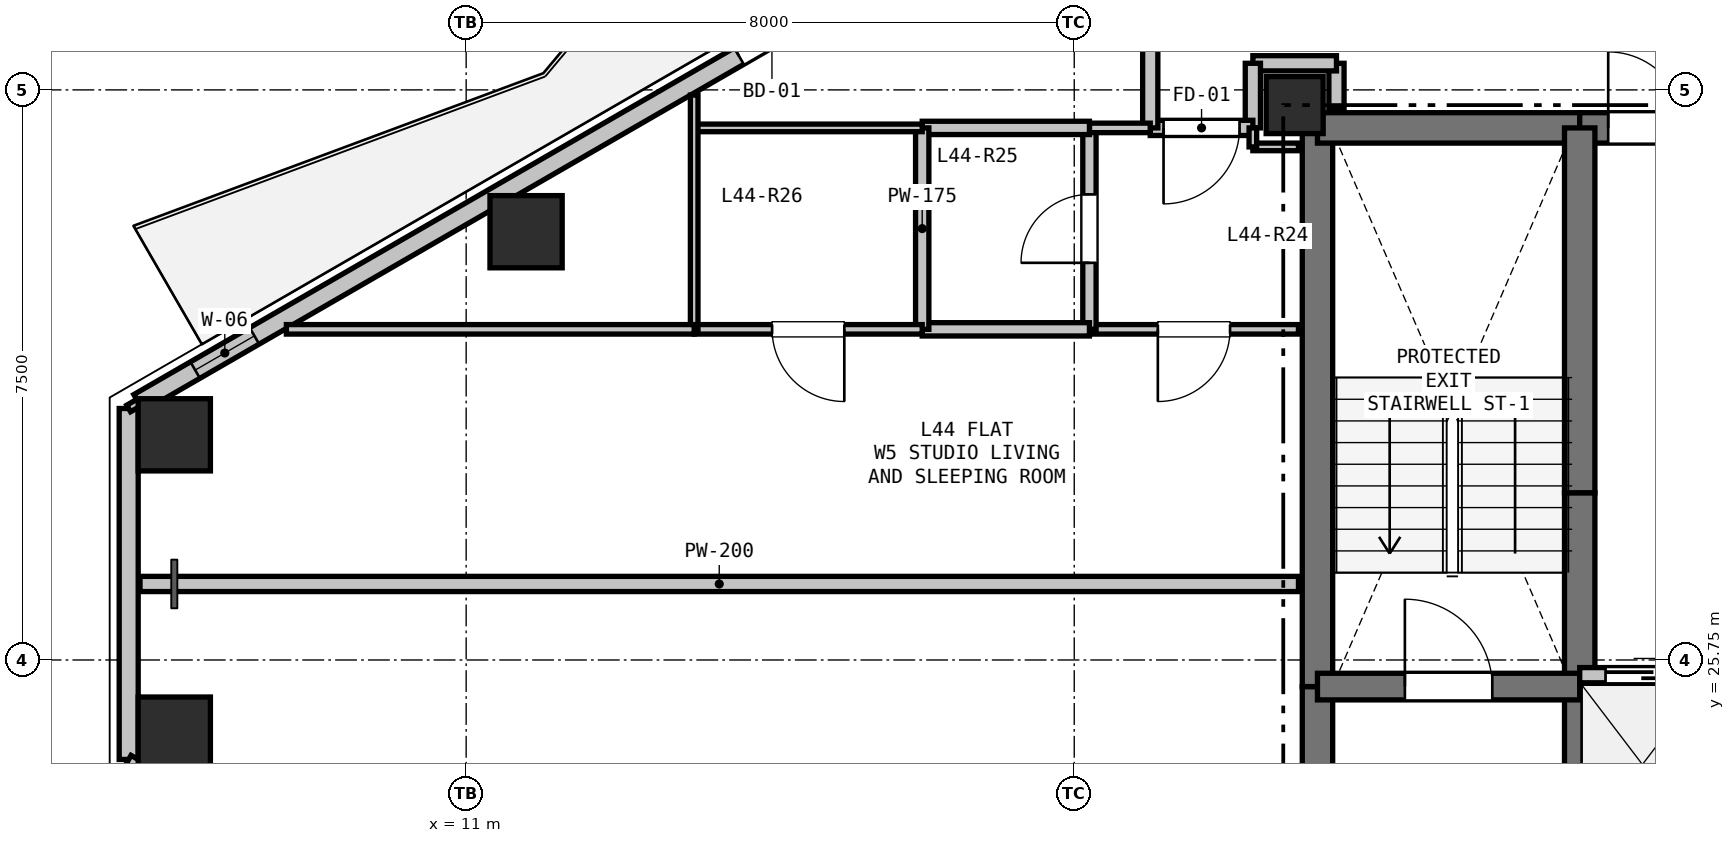
"""IFC4 building model, lengths in metres.
Left out: names, types, materials, properties, quantities, classifications, styles, units other than length and angle.
Written with IfcOpenShell. Run it as: python <this file> out.ifc"""

import sys

from ifc_helpers import new_model, si_unit, direction, frame, frame_2d, origin, origin_2d, place, context, subcontext, project, spatial, rectangle, hollow_rectangle, extrude, element, fill, save


model = new_model("IFC4")
c1 = context("Model", 3, precision=1e-05, world=origin(), true_north=direction((0.0, 1.0)))
c2 = subcontext(c1, "Body", "Model", "MODEL_VIEW")
j1 = project(units=[si_unit("LENGTHUNIT", "METRE"), si_unit("PLANEANGLEUNIT", "RADIAN")], contexts=[c1])
p1 = place(None, origin())
s1 = spatial("IfcSite", under=j1, at=p1, CompositionType="ELEMENT")
p2 = place(p1, origin())
s2 = spatial("IfcBuilding", under=s1, at=p2, CompositionType="ELEMENT")
p3 = place(p2, frame((0.0, 0.0, 157.5)))
s3 = spatial("IfcBuildingStorey", under=s2, at=p3, CompositionType="ELEMENT", Elevation=157.5)
p4 = place(p3, frame((21.9, 33.05, 0.0), z_axis=(0.0, 0.0, 1.0), x_axis=(1.0, 0.0, 0.0)))
e1 = element("IfcColumn", 1, at=p4, inside=s3, PredefinedType="COLUMN", context=c2, shape_type="SweptSolid", body=[
    extrude(rectangle(XDim=0.75, YDim=0.75, at=origin_2d()), origin(), (0.0, 0.0, 1.0), 3.3),
])
for number, where, z_axis, x_axis in (
    (2, (7.16, 28.712, 0.0), (0.0, 0.0, 1.0), (1.0, 0.0, 0.0)),
    (3, (11.788, 31.384, 0.0), (0.0, 0.0, 1.0), (1.0, 0.0, 0.0)),
    (4, (7.16, 24.788, 0.0), (0.0, 0.0, 1.0), (1.0, 0.0, 0.0)),
):
    element("IfcColumn", number, at=place(p3, frame(where, z_axis=z_axis, x_axis=x_axis)), inside=s3, PredefinedType="COLUMN", context=c2, shape_type="SweptSolid", body=[
        extrude(hollow_rectangle(XDim=0.95, YDim=0.95, WallThickness=0.028, at=origin_2d()), origin(), (0.0, 0.0, 1.0), 3.3),
    ])
p5 = place(p3, frame((6.56, 24.441, 0.0), z_axis=(0.0, 0.0, 1.0), x_axis=(0.0, 1.0, 0.0)))
e5 = element("IfcWall", 5, at=p5, inside=s3, PredefinedType="SOLIDWALL", context=c2, shape_type="SweptSolid", body=[
    extrude(rectangle(XDim=4.617, YDim=0.25, at=frame_2d((2.309, 0.0))), origin(), (0.0, 0.0, 1.0), 2.6),
])
p6 = place(p3, frame((6.69, 29.134, 0.0), z_axis=(0.0, 0.0, 1.0), x_axis=(0.866027848477, 0.499995765644, 0.0)))
e6 = element("IfcWall", 6, at=p6, inside=s3, PredefinedType="SOLIDWALL", context=c2, shape_type="SweptSolid", body=[
    extrude(rectangle(XDim=11.186, YDim=0.25, at=frame_2d((5.593, 0.0))), origin(), (0.0, 0.0, 1.0), 2.6),
])
p7 = place(p6, frame((9.122, 0.0, 0.0)))
e7 = element("IfcOpeningElement", 7, at=p7, cuts=e6, PredefinedType="OPENING", context=c2, shape_type="SweptSolid", body=[
    extrude(rectangle(XDim=1.0, YDim=2.1, at=frame_2d((0.5, 1.05))), frame((0.0, 0.135, 0.0), z_axis=(0.0, -1.0, 0.0), x_axis=(1.0, 0.0, 0.0)), (0.0, 0.0, 1.0), 0.27),
])
p8 = place(p6, frame((0.86, 0.0, 0.9)))
e8 = element("IfcOpeningElement", 8, at=p8, cuts=e6, PredefinedType="OPENING", context=c2, shape_type="SweptSolid", body=[
    extrude(rectangle(XDim=0.9, YDim=1.4, at=frame_2d((0.45, 0.7))), frame((0.0, 0.135, 0.0), z_axis=(0.0, -1.0, 0.0), x_axis=(1.0, 0.0, 0.0)), (0.0, 0.0, 1.0), 0.27),
])
p9 = place(p3, frame((16.378, 18.773, 0.0), z_axis=(0.0, 0.0, 1.0), x_axis=(-0.866027848477, 0.499995765644, 0.0)))
e9 = element("IfcWall", 9, at=p9, inside=s3, PredefinedType="SOLIDWALL", context=c2, shape_type="SweptSolid", body=[
    extrude(rectangle(XDim=11.186, YDim=0.25, at=frame_2d((5.593, 0.0))), origin(), (0.0, 0.0, 1.0), 2.6),
])
p10 = place(p9, frame((6.974, 0.0, 0.9)))
e10 = element("IfcOpeningElement", 10, at=p10, cuts=e9, PredefinedType="OPENING", context=c2, shape_type="SweptSolid", body=[
    extrude(rectangle(XDim=1.5, YDim=1.5, at=frame_2d((0.75, 0.75))), frame((0.0, 0.135, 0.0), z_axis=(0.0, -1.0, 0.0), x_axis=(1.0, 0.0, 0.0)), (0.0, 0.0, 1.0), 0.27),
])
p11 = place(p3, frame((22.2, 20.75, 0.0), z_axis=(0.0, 0.0, 1.0), x_axis=(0.0, 1.0, 0.0)))
e11 = element("IfcWall", 11, at=p11, inside=s3, PredefinedType="SHEAR", context=c2, shape_type="SweptSolid", body=[
    extrude(rectangle(XDim=4.65, YDim=0.4, at=frame_2d((2.325, 0.0))), origin(), (0.0, 0.0, 1.0), 2.98),
])
p12 = place(p3, frame((22.2, 25.4, 0.0), z_axis=(0.0, 0.0, 1.0), x_axis=(0.0, 1.0, 0.0)))
e12 = element("IfcWall", 12, at=p12, inside=s3, PredefinedType="SHEAR", context=c2, shape_type="SweptSolid", body=[
    extrude(rectangle(XDim=7.35, YDim=0.4, at=frame_2d((3.675, 0.0))), origin(), (0.0, 0.0, 1.0), 2.98),
])
p13 = place(p3, frame((22.2, 32.75, 0.0), z_axis=(0.0, 0.0, 1.0), x_axis=(1.0, 0.0, 0.0)))
e13 = element("IfcWall", 13, at=p13, inside=s3, PredefinedType="SHEAR", context=c2, shape_type="SweptSolid", body=[
    extrude(rectangle(XDim=3.45, YDim=0.4, at=frame_2d((1.725, 0.0))), origin(), (0.0, 0.0, 1.0), 2.98),
])
p14 = place(p3, frame((25.65, 32.75, 0.0), z_axis=(0.0, 0.0, 1.0), x_axis=(1.0, 0.0, 0.0)))
e14 = element("IfcWall", 14, at=p14, inside=s3, PredefinedType="SHEAR", context=c2, shape_type="SweptSolid", body=[
    extrude(rectangle(XDim=1.75, YDim=0.4, at=frame_2d((0.875, 0.0))), origin(), (0.0, 0.0, 1.0), 2.98),
])
p15 = place(p14, frame((0.375, 0.0, 0.0)))
e15 = element("IfcOpeningElement", 15, at=p15, cuts=e14, PredefinedType="OPENING", context=c2, shape_type="SweptSolid", body=[
    extrude(rectangle(XDim=1.0, YDim=2.15, at=frame_2d((0.5, 1.075))), frame((0.0, 0.21, 0.0), z_axis=(0.0, -1.0, 0.0), x_axis=(1.0, 0.0, 0.0)), (0.0, 0.0, 1.0), 0.42),
])
p16 = place(p3, frame((25.65, 22.75, 0.0), z_axis=(0.0, 0.0, 1.0), x_axis=(0.0, 1.0, 0.0)))
e16 = element("IfcWall", 16, at=p16, inside=s3, PredefinedType="SHEAR", context=c2, shape_type="SweptSolid", body=[
    extrude(rectangle(XDim=2.8, YDim=0.4, at=frame_2d((1.4, 0.0))), origin(), (0.0, 0.0, 1.0), 2.98),
])
p17 = place(p3, frame((25.65, 25.55, 0.0), z_axis=(0.0, 0.0, 1.0), x_axis=(0.0, 1.0, 0.0)))
e17 = element("IfcWall", 17, at=p17, inside=s3, PredefinedType="SHEAR", context=c2, shape_type="SweptSolid", body=[
    extrude(rectangle(XDim=2.4, YDim=0.4, at=frame_2d((1.2, 0.0))), origin(), (0.0, 0.0, 1.0), 2.98),
])
p18 = place(p3, frame((25.65, 27.95, 0.0), z_axis=(0.0, 0.0, 1.0), x_axis=(0.0, 1.0, 0.0)))
e18 = element("IfcWall", 18, at=p18, inside=s3, PredefinedType="SHEAR", context=c2, shape_type="SweptSolid", body=[
    extrude(rectangle(XDim=4.8, YDim=0.4, at=frame_2d((2.4, 0.0))), origin(), (0.0, 0.0, 1.0), 2.98),
])
p19 = place(p3, frame((22.2, 25.4, 0.0), z_axis=(0.0, 0.0, 1.0), x_axis=(1.0, 0.0, 0.0)))
e19 = element("IfcWall", 19, at=p19, inside=s3, PredefinedType="SHEAR", context=c2, shape_type="SweptSolid", body=[
    extrude(rectangle(XDim=3.45, YDim=0.35, at=frame_2d((1.725, 0.0))), origin(), (0.0, 0.0, 1.0), 2.98),
])
p20 = place(p19, frame((1.15, 0.0, 0.0)))
e20 = element("IfcOpeningElement", 20, at=p20, cuts=e19, PredefinedType="OPENING", context=c2, shape_type="SweptSolid", body=[
    extrude(rectangle(XDim=1.15, YDim=2.15, at=frame_2d((0.575, 1.075))), frame((0.0, 0.185, 0.0), z_axis=(0.0, -1.0, 0.0), x_axis=(1.0, 0.0, 0.0)), (0.0, 0.0, 1.0), 0.37),
])
p21 = place(p3, frame((25.65, 25.55, 0.0), z_axis=(0.0, 0.0, 1.0), x_axis=(1.0, 0.0, 0.0)))
e21 = element("IfcWall", 21, at=p21, inside=s3, PredefinedType="PARTITIONING", context=c2, shape_type="SweptSolid", body=[
    extrude(rectangle(XDim=4.95, YDim=0.2, at=frame_2d((2.475, 0.0))), origin(), (0.0, 0.0, 1.0), 2.98),
])
p22 = place(p21, frame((0.34, 0.0, 0.0)))
e22 = element("IfcOpeningElement", 22, at=p22, cuts=e21, PredefinedType="OPENING", context=c2, shape_type="SweptSolid", body=[
    extrude(rectangle(XDim=1.1, YDim=2.15, at=frame_2d((0.55, 1.075))), frame((0.0, 0.11, 0.0), z_axis=(0.0, -1.0, 0.0), x_axis=(1.0, 0.0, 0.0)), (0.0, 0.0, 1.0), 0.22),
])
p23 = place(p21, frame((1.99, 0.0, 0.0)))
e23 = element("IfcOpeningElement", 23, at=p23, cuts=e21, PredefinedType="OPENING", context=c2, shape_type="SweptSolid", body=[
    extrude(rectangle(XDim=1.1, YDim=2.15, at=frame_2d((0.55, 1.075))), frame((0.0, 0.11, 0.0), z_axis=(0.0, -1.0, 0.0), x_axis=(1.0, 0.0, 0.0)), (0.0, 0.0, 1.0), 0.22),
])
p24 = place(p21, frame((3.64, 0.0, 0.0)))
e24 = element("IfcOpeningElement", 24, at=p24, cuts=e21, PredefinedType="OPENING", context=c2, shape_type="SweptSolid", body=[
    extrude(rectangle(XDim=1.1, YDim=2.15, at=frame_2d((0.55, 1.075))), frame((0.0, 0.11, 0.0), z_axis=(0.0, -1.0, 0.0), x_axis=(1.0, 0.0, 0.0)), (0.0, 0.0, 1.0), 0.22),
])
p25 = place(p3, frame((22.45, 33.0, 0.0), z_axis=(0.0, 0.0, 1.0), x_axis=(0.0, 1.0, 0.0)))
e25 = element("IfcWall", 25, at=p25, inside=s3, PredefinedType="PARTITIONING", context=c2, shape_type="SweptSolid", body=[
    extrude(rectangle(XDim=0.6, YDim=0.2, at=frame_2d((0.3, 0.0))), origin(), (0.0, 0.0, 1.0), 2.505),
])
p26 = place(p3, frame((22.45, 33.6, 0.0), z_axis=(0.0, 0.0, 1.0), x_axis=(-1.0, 0.0, 0.0)))
e26 = element("IfcWall", 26, at=p26, inside=s3, PredefinedType="PARTITIONING", context=c2, shape_type="SweptSolid", body=[
    extrude(rectangle(XDim=1.1, YDim=0.2, at=frame_2d((0.55, 0.0))), origin(), (0.0, 0.0, 1.0), 2.98),
])
p27 = place(p3, frame((21.35, 33.6, 0.0), z_axis=(0.0, 0.0, 1.0), x_axis=(0.0, -1.0, 0.0)))
e27 = element("IfcWall", 27, at=p27, inside=s3, PredefinedType="PARTITIONING", context=c2, shape_type="SweptSolid", body=[
    extrude(rectangle(XDim=0.85, YDim=0.2, at=frame_2d((0.425, 0.0))), origin(), (0.0, 0.0, 1.0), 2.428),
])
p28 = place(p3, frame((21.35, 32.75, 0.0), z_axis=(0.0, 0.0, 1.0), x_axis=(-1.0, 0.0, 0.0)))
e28 = element("IfcWall", 28, at=p28, inside=s3, PredefinedType="PARTITIONING", context=c2, shape_type="SweptSolid", body=[
    extrude(rectangle(XDim=1.35, YDim=0.2, at=frame_2d((0.675, 0.0))), origin(), (0.0, 0.0, 1.0), 2.428),
])
p29 = place(p28, frame((0.175, 0.0, 0.0)))
e29 = element("IfcOpeningElement", 29, at=p29, cuts=e28, PredefinedType="OPENING", context=c2, shape_type="SweptSolid", body=[
    extrude(rectangle(XDim=1.0, YDim=2.15, at=frame_2d((0.5, 1.075))), frame((0.0, 0.11, 0.0), z_axis=(0.0, -1.0, 0.0), x_axis=(1.0, 0.0, 0.0)), (0.0, 0.0, 1.0), 0.22),
])
p30 = place(p3, frame((20.0, 32.75, 0.0), z_axis=(0.0, 0.0, 1.0), x_axis=(0.0, 1.0, 0.0)))
e30 = element("IfcWall", 30, at=p30, inside=s3, PredefinedType="PARTITIONING", context=c2, shape_type="SweptSolid", body=[
    extrude(rectangle(XDim=2.6, YDim=0.2, at=frame_2d((1.3, 0.0))), origin(), (0.0, 0.0, 1.0), 2.428),
])
p31 = place(p3, frame((21.35, 32.5, 0.0), z_axis=(0.0, 0.0, 1.0), x_axis=(1.0, 0.0, 0.0)))
e31 = element("IfcWall", 31, at=p31, inside=s3, PredefinedType="PARTITIONING", context=c2, shape_type="SweptSolid", body=[
    extrude(rectangle(XDim=0.6, YDim=0.1, at=frame_2d((0.3, 0.0))), origin(), (0.0, 0.0, 1.0), 2.505),
])
p32 = place(p3, frame((21.95, 30.1, 0.0), z_axis=(0.0, 0.0, 1.0), x_axis=(-1.0, 0.0, 0.0)))
e32 = element("IfcWall", 32, at=p32, inside=s3, PredefinedType="PARTITIONING", context=c2, shape_type="SweptSolid", body=[
    extrude(rectangle(XDim=2.75, YDim=0.125, at=frame_2d((1.375, 0.0))), origin(), (0.0, 0.0, 1.0), 2.505),
])
p33 = place(p32, frame((0.9, 0.0, 0.0)))
e33 = element("IfcOpeningElement", 33, at=p33, cuts=e32, PredefinedType="OPENING", context=c2, shape_type="SweptSolid", body=[
    extrude(rectangle(XDim=0.95, YDim=2.1, at=frame_2d((0.475, 1.05))), frame((0.0, 0.073, 0.0), z_axis=(0.0, -1.0, 0.0), x_axis=(1.0, 0.0, 0.0)), (0.0, 0.0, 1.0), 0.145),
])
p34 = place(p3, frame((19.2, 30.1, 0.0), z_axis=(0.0, 0.0, 1.0), x_axis=(0.0, 1.0, 0.0)))
e34 = element("IfcWall", 34, at=p34, inside=s3, PredefinedType="PLUMBINGWALL", context=c2, shape_type="SweptSolid", body=[
    extrude(rectangle(XDim=2.65, YDim=0.175, at=frame_2d((1.325, 0.0))), origin(), (0.0, 0.0, 1.0), 2.428),
])
p35 = place(p34, frame((0.875, 0.0, 0.0)))
e35 = element("IfcOpeningElement", 35, at=p35, cuts=e34, PredefinedType="OPENING", context=c2, shape_type="SweptSolid", body=[
    extrude(rectangle(XDim=0.9, YDim=2.1, at=frame_2d((0.45, 1.05))), frame((0.0, 0.097, 0.0), z_axis=(0.0, -1.0, 0.0), x_axis=(1.0, 0.0, 0.0)), (0.0, 0.0, 1.0), 0.195),
])
p36 = place(p3, frame((19.2, 32.75, 0.0), z_axis=(0.0, 0.0, 1.0), x_axis=(1.0, 0.0, 0.0)))
e36 = element("IfcWall", 36, at=p36, inside=s3, PredefinedType="PARTITIONING", context=c2, shape_type="SweptSolid", body=[
    extrude(rectangle(XDim=0.8, YDim=0.125, at=frame_2d((0.4, 0.0))), origin(), (0.0, 0.0, 1.0), 2.428),
])
p37 = place(p3, frame((21.35, 32.75, 0.0), z_axis=(0.0, 0.0, 1.0), x_axis=(0.0, -1.0, 0.0)))
e37 = element("IfcWall", 37, at=p37, inside=s3, PredefinedType="PARTITIONING", context=c2, shape_type="SweptSolid", body=[
    extrude(rectangle(XDim=0.25, YDim=0.1, at=frame_2d((0.125, 0.0))), origin(), (0.0, 0.0, 1.0), 2.98),
])
p38 = place(p3, frame((17.0, 32.75, 0.0), z_axis=(0.0, 0.0, 1.0), x_axis=(1.0, 0.0, 0.0)))
e38 = element("IfcWall", 38, at=p38, inside=s3, PredefinedType="PLUMBINGWALL", context=c2, shape_type="SweptSolid", body=[
    extrude(rectangle(XDim=2.2, YDim=0.175, at=frame_2d((1.1, 0.0))), origin(), (0.0, 0.0, 1.0), 2.428),
])
p39 = place(p3, frame((19.2, 30.1, 0.0), z_axis=(0.0, 0.0, 1.0), x_axis=(-1.0, 0.0, 0.0)))
e39 = element("IfcWall", 39, at=p39, inside=s3, PredefinedType="PLUMBINGWALL", context=c2, shape_type="SweptSolid", body=[
    extrude(rectangle(XDim=2.2, YDim=0.175, at=frame_2d((1.1, 0.0))), origin(), (0.0, 0.0, 1.0), 2.98),
])
p40 = place(p3, frame((17.0, 30.1, 0.0), z_axis=(0.0, 0.0, 1.0), x_axis=(0.0, 1.0, 0.0)))
e40 = element("IfcWall", 40, at=p40, inside=s3, PredefinedType="PLUMBINGWALL", context=c2, shape_type="SweptSolid", body=[
    extrude(rectangle(XDim=2.65, YDim=0.175, at=frame_2d((1.325, 0.0))), origin(), (0.0, 0.0, 1.0), 2.428),
])
p41 = place(p3, frame((14.0, 32.75, 0.0), z_axis=(0.0, 0.0, 1.0), x_axis=(1.0, 0.0, 0.0)))
e41 = element("IfcWall", 41, at=p41, inside=s3, PredefinedType="PARTITIONING", context=c2, shape_type="SweptSolid", body=[
    extrude(rectangle(XDim=3.0, YDim=0.1, at=frame_2d((1.5, 0.0))), origin(), (0.0, 0.0, 1.0), 2.365),
])
p42 = place(p3, frame((17.0, 30.1, 0.0), z_axis=(0.0, 0.0, 1.0), x_axis=(-1.0, 0.0, 0.0)))
e42 = element("IfcWall", 42, at=p42, inside=s3, PredefinedType="PARTITIONING", context=c2, shape_type="SweptSolid", body=[
    extrude(rectangle(XDim=3.0, YDim=0.125, at=frame_2d((1.5, 0.0))), origin(), (0.0, 0.0, 1.0), 2.98),
])
p43 = place(p42, frame((1.025, 0.0, 0.0)))
e43 = element("IfcOpeningElement", 43, at=p43, cuts=e42, PredefinedType="OPENING", context=c2, shape_type="SweptSolid", body=[
    extrude(rectangle(XDim=0.95, YDim=2.1, at=frame_2d((0.475, 1.05))), frame((0.0, 0.073, 0.0), z_axis=(0.0, -1.0, 0.0), x_axis=(1.0, 0.0, 0.0)), (0.0, 0.0, 1.0), 0.145),
])
p44 = place(p3, frame((14.0, 30.1, 0.0), z_axis=(0.0, 0.0, 1.0), x_axis=(0.0, 1.0, 0.0)))
e44 = element("IfcWall", 44, at=p44, inside=s3, PredefinedType="PARTITIONING", context=c2, shape_type="SweptSolid", body=[
    extrude(rectangle(XDim=3.082, YDim=0.1, at=frame_2d((1.541, 0.0))), origin(), (0.0, 0.0, 1.0), 2.365),
])
p45 = place(p3, frame((6.709, 26.75, 0.0), z_axis=(0.0, 0.0, 1.0), x_axis=(1.0, 0.0, 0.0)))
e45 = element("IfcWall", 45, at=p45, inside=s3, PredefinedType="PARTITIONING", context=c2, shape_type="SweptSolid", body=[
    extrude(rectangle(XDim=15.241, YDim=0.2, at=frame_2d((7.62, 0.0))), origin(), (0.0, 0.0, 1.0), 2.505),
])
p46 = place(p3, frame((6.69, 24.366, 0.0), z_axis=(0.0, 0.0, 1.0), x_axis=(-0.866131372301, 0.499816412211, 0.0)))
e46 = element("IfcWall", 46, at=p46, inside=s3, PredefinedType="PARTITIONING", context=c2, shape_type="SweptSolid", body=[
    extrude(rectangle(XDim=0.15, YDim=0.125, at=frame_2d((0.075, 0.0))), origin(), (0.0, 0.0, 1.0), 2.98),
])
p47 = place(p3, frame((8.635, 30.1, 0.0), z_axis=(0.0, 0.0, 1.0), x_axis=(1.0, 0.0, 0.0)))
e47 = element("IfcWall", 47, at=p47, inside=s3, PredefinedType="PARTITIONING", context=c2, shape_type="SweptSolid", body=[
    extrude(rectangle(XDim=5.365, YDim=0.125, at=frame_2d((2.683, 0.0))), origin(), (0.0, 0.0, 1.0), 2.645),
])
p48 = place(p3, frame((6.56, 29.059, 0.0), z_axis=(0.0, 0.0, 1.0), x_axis=(0.866131372301, 0.499816412211, 0.0)))
e48 = element("IfcWall", 48, at=p48, inside=s3, PredefinedType="PARTITIONING", context=c2, shape_type="SweptSolid", body=[
    extrude(rectangle(XDim=0.15, YDim=0.1, at=frame_2d((0.075, 0.0))), origin(), (0.0, 0.0, 1.0), 2.98),
])
p49 = place(p7, origin())
e49 = element("IfcDoor", 49, at=p49, inside=s3, OperationType="SINGLE_SWING_LEFT", PredefinedType="DOOR", context=c2, shape_type="SweptSolid", body=[
    extrude(rectangle(XDim=1.0, YDim=2.1, at=frame_2d((0.5, 1.05))), frame((0.0, 0.025, 0.0), z_axis=(0.0, -1.0, 0.0), x_axis=(1.0, 0.0, 0.0)), (0.0, 0.0, 1.0), 0.05),
])
fill(e7, e49)
p50 = place(p8, origin())
e50 = element("IfcWindow", 50, at=p50, inside=s3, PartitioningType="SINGLE_PANEL", PredefinedType="WINDOW", context=c2, shape_type="SweptSolid", body=[
    extrude(rectangle(XDim=0.9, YDim=1.4, at=frame_2d((0.45, 0.7))), frame((0.0, 0.03, 0.0), z_axis=(0.0, -1.0, 0.0), x_axis=(1.0, 0.0, 0.0)), (0.0, 0.0, 1.0), 0.06),
])
fill(e8, e50)
p51 = place(p22, origin())
e51 = element("IfcDoor", 51, at=p51, inside=s3, OperationType="SLIDING_TO_LEFT", PredefinedType="DOOR", context=c2, shape_type="SweptSolid", body=[
    extrude(rectangle(XDim=1.1, YDim=2.15, at=frame_2d((0.55, 1.075))), frame((0.0, 0.025, 0.0), z_axis=(0.0, -1.0, 0.0), x_axis=(1.0, 0.0, 0.0)), (0.0, 0.0, 1.0), 0.05),
])
fill(e22, e51)
p52 = place(p15, origin())
e52 = element("IfcDoor", 52, at=p52, inside=s3, OperationType="SINGLE_SWING_LEFT", PredefinedType="DOOR", context=c2, shape_type="SweptSolid", body=[
    extrude(rectangle(XDim=1.0, YDim=2.15, at=frame_2d((0.5, 1.075))), frame((0.0, 0.025, 0.0), z_axis=(0.0, -1.0, 0.0), x_axis=(1.0, 0.0, 0.0)), (0.0, 0.0, 1.0), 0.05),
])
fill(e15, e52)
p53 = place(p20, origin())
e53 = element("IfcDoor", 53, at=p53, inside=s3, OperationType="SINGLE_SWING_LEFT", PredefinedType="DOOR", context=c2, shape_type="SweptSolid", body=[
    extrude(rectangle(XDim=1.15, YDim=2.15, at=frame_2d((0.575, 1.075))), frame((0.0, 0.025, 0.0), z_axis=(0.0, -1.0, 0.0), x_axis=(1.0, 0.0, 0.0)), (0.0, 0.0, 1.0), 0.05),
])
fill(e20, e53)
p54 = place(p29, origin())
e54 = element("IfcDoor", 54, at=p54, inside=s3, OperationType="SINGLE_SWING_RIGHT", PredefinedType="DOOR", context=c2, shape_type="SweptSolid", body=[
    extrude(rectangle(XDim=1.0, YDim=2.15, at=frame_2d((0.5, 1.075))), frame((0.0, 0.025, 0.0), z_axis=(0.0, -1.0, 0.0), x_axis=(1.0, 0.0, 0.0)), (0.0, 0.0, 1.0), 0.05),
])
fill(e29, e54)
p55 = place(p35, origin())
e55 = element("IfcDoor", 55, at=p55, inside=s3, OperationType="SINGLE_SWING_LEFT", PredefinedType="DOOR", context=c2, shape_type="SweptSolid", body=[
    extrude(rectangle(XDim=0.9, YDim=2.1, at=frame_2d((0.45, 1.05))), frame((0.0, 0.025, 0.0), z_axis=(0.0, -1.0, 0.0), x_axis=(1.0, 0.0, 0.0)), (0.0, 0.0, 1.0), 0.05),
])
fill(e35, e55)
p56 = place(p33, origin())
e56 = element("IfcDoor", 56, at=p56, inside=s3, OperationType="SINGLE_SWING_RIGHT", PredefinedType="DOOR", context=c2, shape_type="SweptSolid", body=[
    extrude(rectangle(XDim=0.95, YDim=2.1, at=frame_2d((0.475, 1.05))), frame((0.0, 0.025, 0.0), z_axis=(0.0, -1.0, 0.0), x_axis=(1.0, 0.0, 0.0)), (0.0, 0.0, 1.0), 0.05),
])
fill(e33, e56)
p57 = place(p43, origin())
e57 = element("IfcDoor", 57, at=p57, inside=s3, OperationType="SINGLE_SWING_LEFT", PredefinedType="DOOR", context=c2, shape_type="SweptSolid", body=[
    extrude(rectangle(XDim=0.95, YDim=2.1, at=frame_2d((0.475, 1.05))), frame((0.0, 0.025, 0.0), z_axis=(0.0, -1.0, 0.0), x_axis=(1.0, 0.0, 0.0)), (0.0, 0.0, 1.0), 0.05),
])
fill(e43, e57)
save(model, sys.argv[1])
